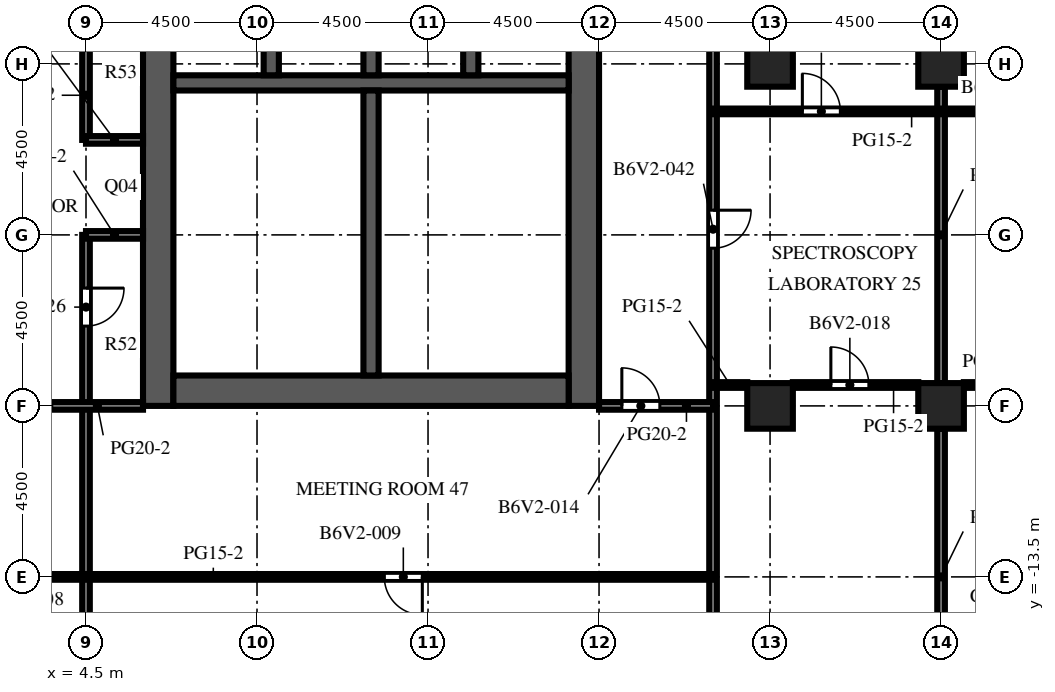
"""IFC4 building model, lengths in metres.
Left out: names, types, materials, properties, quantities, classifications, styles, units other than length and angle.
Written with IfcOpenShell. Run it as: python <this file> out.ifc"""

import sys

from ifc_helpers import new_model, si_unit, direction, frame, frame_2d, origin, origin_2d, place, context, subcontext, project, spatial, rectangle, extrude, element, fill, save


model = new_model("IFC4")
c1 = context("Model", 3, precision=1e-05, world=origin(), true_north=direction((0.0, 1.0)))
c2 = subcontext(c1, "Body", "Model", "MODEL_VIEW")
j1 = project(units=[si_unit("LENGTHUNIT", "METRE"), si_unit("PLANEANGLEUNIT", "RADIAN")], contexts=[c1])
p1 = place(None, origin())
s1 = spatial("IfcSite", under=j1, at=p1, CompositionType="ELEMENT")
p2 = place(p1, origin())
s2 = spatial("IfcBuilding", under=s1, at=p2, CompositionType="ELEMENT")
p3 = place(p2, frame((0.0, 0.0, 216.1)))
s3 = spatial("IfcBuildingStorey", under=s2, at=p3, CompositionType="ELEMENT", Elevation=216.1)
for number, where, z_axis, x_axis in (
    (1, (22.5, -9.0, 0.0), (0.0, 0.0, 1.0), (1.0, 0.0, 0.0)),
    (2, (22.5, 0.0, 0.0), (0.0, 0.0, 1.0), (1.0, 0.0, 0.0)),
    (3, (27.0, -9.0, 0.0), (0.0, 0.0, 1.0), (1.0, 0.0, 0.0)),
    (4, (27.0, 0.0, 0.0), (0.0, 0.0, 1.0), (1.0, 0.0, 0.0)),
):
    element("IfcColumn", number, at=place(p3, frame(where, z_axis=z_axis, x_axis=x_axis)), inside=s3, PredefinedType="COLUMN", context=c2, shape_type="SweptSolid", body=[
        extrude(rectangle(XDim=1.2, YDim=1.2, at=origin_2d()), origin(), (0.0, 0.0, 1.0), 4.1),
    ])
p4 = place(p3, frame((6.4, -9.0, 0.0), z_axis=(0.0, 0.0, 1.0), x_axis=(0.0, 1.0, 0.0)))
e5 = element("IfcWall", 5, at=p4, inside=s3, PredefinedType="SHEAR", context=c2, shape_type="SweptSolid", body=[
    extrude(rectangle(XDim=27.5, YDim=0.8, at=frame_2d((13.75, 0.0))), origin(), (0.0, 0.0, 1.0), 4.1),
])
p5 = place(p4, frame((12.55, 0.0, 0.0)))
e6 = element("IfcOpeningElement", 6, at=p5, cuts=e5, PredefinedType="OPENING", context=c2, shape_type="SweptSolid", body=[
    extrude(rectangle(XDim=2.4, YDim=2.4, at=frame_2d((1.2, 1.2))), frame((0.0, 0.41, 0.0), z_axis=(0.0, -1.0, 0.0), x_axis=(1.0, 0.0, 0.0)), (0.0, 0.0, 1.0), 0.82),
])
p6 = place(p4, frame((5.5, 0.0, 0.0)))
e7 = element("IfcOpeningElement", 7, at=p6, cuts=e5, PredefinedType="OPENING", context=c2, shape_type="SweptSolid", body=[
    extrude(rectangle(XDim=0.95, YDim=2.1, at=frame_2d((0.475, 1.05))), frame((0.0, 0.41, 0.0), z_axis=(0.0, -1.0, 0.0), x_axis=(1.0, 0.0, 0.0)), (0.0, 0.0, 1.0), 0.82),
])
p7 = place(p4, frame((23.475, 0.0, 0.0)))
e8 = element("IfcOpeningElement", 8, at=p7, cuts=e5, PredefinedType="OPENING", context=c2, shape_type="SweptSolid", body=[
    extrude(rectangle(XDim=1.2, YDim=2.1, at=frame_2d((0.6, 1.05))), frame((0.0, 0.41, 0.0), z_axis=(0.0, -1.0, 0.0), x_axis=(1.0, 0.0, 0.0)), (0.0, 0.0, 1.0), 0.82),
])
p8 = place(p3, frame((17.6, -9.0, 0.0), z_axis=(0.0, 0.0, 1.0), x_axis=(0.0, 1.0, 0.0)))
e9 = element("IfcWall", 9, at=p8, inside=s3, PredefinedType="SHEAR", context=c2, shape_type="SweptSolid", body=[
    extrude(rectangle(XDim=27.5, YDim=0.8, at=frame_2d((13.75, 0.0))), origin(), (0.0, 0.0, 1.0), 4.1),
])
p9 = place(p8, frame((12.55, 0.0, 0.0)))
e10 = element("IfcOpeningElement", 10, at=p9, cuts=e9, PredefinedType="OPENING", context=c2, shape_type="SweptSolid", body=[
    extrude(rectangle(XDim=2.4, YDim=2.4, at=frame_2d((1.2, 1.2))), frame((0.0, 0.41, 0.0), z_axis=(0.0, -1.0, 0.0), x_axis=(1.0, 0.0, 0.0)), (0.0, 0.0, 1.0), 0.82),
])
p10 = place(p8, frame((6.825, 0.0, 0.0)))
e11 = element("IfcOpeningElement", 11, at=p10, cuts=e9, PredefinedType="OPENING", context=c2, shape_type="SweptSolid", body=[
    extrude(rectangle(XDim=1.2, YDim=2.1, at=frame_2d((0.6, 1.05))), frame((0.0, 0.41, 0.0), z_axis=(0.0, -1.0, 0.0), x_axis=(1.0, 0.0, 0.0)), (0.0, 0.0, 1.0), 0.82),
])
p11 = place(p8, frame((19.475, 0.0, 0.0)))
e12 = element("IfcOpeningElement", 12, at=p11, cuts=e9, PredefinedType="OPENING", context=c2, shape_type="SweptSolid", body=[
    extrude(rectangle(XDim=1.2, YDim=2.1, at=frame_2d((0.6, 1.05))), frame((0.0, 0.41, 0.0), z_axis=(0.0, -1.0, 0.0), x_axis=(1.0, 0.0, 0.0)), (0.0, 0.0, 1.0), 0.82),
])
p12 = place(p3, frame((6.8, -8.6, 0.0), z_axis=(0.0, 0.0, 1.0), x_axis=(1.0, 0.0, 0.0)))
e13 = element("IfcWall", 13, at=p12, inside=s3, PredefinedType="SHEAR", context=c2, shape_type="SweptSolid", body=[
    extrude(rectangle(XDim=10.4, YDim=0.8, at=frame_2d((5.2, 0.0))), origin(), (0.0, 0.0, 1.0), 4.1),
])
p13 = place(p3, frame((6.8, -0.5, 0.0), z_axis=(0.0, 0.0, 1.0), x_axis=(1.0, 0.0, 0.0)))
e14 = element("IfcWall", 14, at=p13, inside=s3, PredefinedType="SHEAR", context=c2, shape_type="SweptSolid", body=[
    extrude(rectangle(XDim=10.4, YDim=0.4, at=frame_2d((5.2, 0.0))), origin(), (0.0, 0.0, 1.0), 4.1),
])
for number, where, z_axis, x_axis in (
    (15, (9.375, -0.3, 0.0), (0.0, 0.0, 1.0), (0.0, 1.0, 0.0)),
    (16, (12.0, -0.3, 0.0), (0.0, 0.0, 1.0), (0.0, 1.0, 0.0)),
    (17, (14.625, -0.3, 0.0), (0.0, 0.0, 1.0), (0.0, 1.0, 0.0)),
):
    element("IfcWall", number, at=place(p3, frame(where, z_axis=z_axis, x_axis=x_axis)), inside=s3, PredefinedType="SHEAR", context=c2, shape_type="SweptSolid", body=[
        extrude(rectangle(XDim=2.9, YDim=0.4, at=frame_2d((1.45, 0.0))), origin(), (0.0, 0.0, 1.0), 4.1),
    ])
p14 = place(p3, frame((12.0, -8.2, 0.0), z_axis=(0.0, 0.0, 1.0), x_axis=(0.0, 1.0, 0.0)))
e18 = element("IfcWall", 18, at=p14, inside=s3, PredefinedType="SHEAR", context=c2, shape_type="SweptSolid", body=[
    extrude(rectangle(XDim=7.5, YDim=0.4, at=frame_2d((3.75, 0.0))), origin(), (0.0, 0.0, 1.0), 4.1),
])
p15 = place(p3, frame((6.8, -3.7, 0.0), z_axis=(0.0, 0.0, 1.0), x_axis=(1.0, 0.0, 0.0)))
e19 = element("IfcWall", 19, at=p15, inside=s3, PredefinedType="PARTITIONING", context=c2, shape_type="SweptSolid", body=[
    extrude(rectangle(XDim=2.5, YDim=0.1, at=frame_2d((1.25, 0.0))), origin(), (0.0, 0.0, 1.0), 3.5),
])
p16 = place(p15, frame((0.75, 0.0, 0.0)))
e20 = element("IfcOpeningElement", 20, at=p16, cuts=e19, PredefinedType="OPENING", context=c2, shape_type="SweptSolid", body=[
    extrude(rectangle(XDim=1.0, YDim=2.1, at=frame_2d((0.5, 1.05))), frame((0.0, 0.06, 0.0), z_axis=(0.0, -1.0, 0.0), x_axis=(1.0, 0.0, 0.0)), (0.0, 0.0, 1.0), 0.12),
])
p17 = place(p3, frame((9.3, -3.7, 0.0), z_axis=(0.0, 0.0, 1.0), x_axis=(1.0, 0.0, 0.0)))
e21 = element("IfcWall", 21, at=p17, inside=s3, PredefinedType="PARTITIONING", context=c2, shape_type="SweptSolid", body=[
    extrude(rectangle(XDim=2.5, YDim=0.1, at=frame_2d((1.25, 0.0))), origin(), (0.0, 0.0, 1.0), 3.5),
])
p18 = place(p17, frame((0.75, 0.0, 0.0)))
e22 = element("IfcOpeningElement", 22, at=p18, cuts=e21, PredefinedType="OPENING", context=c2, shape_type="SweptSolid", body=[
    extrude(rectangle(XDim=1.0, YDim=2.1, at=frame_2d((0.5, 1.05))), frame((0.0, 0.06, 0.0), z_axis=(0.0, -1.0, 0.0), x_axis=(1.0, 0.0, 0.0)), (0.0, 0.0, 1.0), 0.12),
])
p19 = place(p3, frame((6.8, -2.35, 0.0), z_axis=(0.0, 0.0, 1.0), x_axis=(1.0, 0.0, 0.0)))
e23 = element("IfcWall", 23, at=p19, inside=s3, PredefinedType="PARTITIONING", context=c2, shape_type="SweptSolid", body=[
    extrude(rectangle(XDim=2.5, YDim=0.1, at=frame_2d((1.25, 0.0))), origin(), (0.0, 0.0, 1.0), 3.5),
])
p20 = place(p19, frame((0.75, 0.0, 0.0)))
e24 = element("IfcOpeningElement", 24, at=p20, cuts=e23, PredefinedType="OPENING", context=c2, shape_type="SweptSolid", body=[
    extrude(rectangle(XDim=1.0, YDim=2.1, at=frame_2d((0.5, 1.05))), frame((0.0, 0.06, 0.0), z_axis=(0.0, -1.0, 0.0), x_axis=(1.0, 0.0, 0.0)), (0.0, 0.0, 1.0), 0.12),
])
p21 = place(p3, frame((9.3, -2.35, 0.0), z_axis=(0.0, 0.0, 1.0), x_axis=(1.0, 0.0, 0.0)))
e25 = element("IfcWall", 25, at=p21, inside=s3, PredefinedType="PARTITIONING", context=c2, shape_type="SweptSolid", body=[
    extrude(rectangle(XDim=2.5, YDim=0.1, at=frame_2d((1.25, 0.0))), origin(), (0.0, 0.0, 1.0), 3.5),
])
p22 = place(p21, frame((0.75, 0.0, 0.0)))
e26 = element("IfcOpeningElement", 26, at=p22, cuts=e25, PredefinedType="OPENING", context=c2, shape_type="SweptSolid", body=[
    extrude(rectangle(XDim=1.0, YDim=2.1, at=frame_2d((0.5, 1.05))), frame((0.0, 0.06, 0.0), z_axis=(0.0, -1.0, 0.0), x_axis=(1.0, 0.0, 0.0)), (0.0, 0.0, 1.0), 0.12),
])
p23 = place(p3, frame((9.3, -8.2, 0.0), z_axis=(0.0, 0.0, 1.0), x_axis=(0.0, 1.0, 0.0)))
e27 = element("IfcWall", 27, at=p23, inside=s3, PredefinedType="PARTITIONING", context=c2, shape_type="SweptSolid", body=[
    extrude(rectangle(XDim=4.5, YDim=0.1, at=frame_2d((2.25, 0.0))), origin(), (0.0, 0.0, 1.0), 3.5),
])
p24 = place(p3, frame((9.3, -2.35, 0.0), z_axis=(0.0, 0.0, 1.0), x_axis=(0.0, 1.0, 0.0)))
e28 = element("IfcWall", 28, at=p24, inside=s3, PredefinedType="PARTITIONING", context=c2, shape_type="SweptSolid", body=[
    extrude(rectangle(XDim=1.65, YDim=0.1, at=frame_2d((0.825, 0.0))), origin(), (0.0, 0.0, 1.0), 3.5),
])
p25 = place(p3, frame((4.5, -4.5, 0.0), z_axis=(0.0, 0.0, 1.0), x_axis=(0.0, -1.0, 0.0)))
e29 = element("IfcWall", 29, at=p25, inside=s3, PredefinedType="PARTITIONING", context=c2, shape_type="SweptSolid", body=[
    extrude(rectangle(XDim=22.0, YDim=0.2, at=frame_2d((11.0, 0.0))), origin(), (0.0, 0.0, 1.0), 3.5),
])
p26 = place(p25, frame((1.4, 0.0, 0.0)))
e30 = element("IfcOpeningElement", 30, at=p26, cuts=e29, PredefinedType="OPENING", context=c2, shape_type="SweptSolid", body=[
    extrude(rectangle(XDim=1.0, YDim=2.1, at=frame_2d((0.5, 1.05))), frame((0.0, 0.11, 0.0), z_axis=(0.0, -1.0, 0.0), x_axis=(1.0, 0.0, 0.0)), (0.0, 0.0, 1.0), 0.22),
])
p27 = place(p3, frame((4.5, 2.8, 0.0), z_axis=(0.0, 0.0, 1.0), x_axis=(0.0, -1.0, 0.0)))
e31 = element("IfcWall", 31, at=p27, inside=s3, PredefinedType="PARTITIONING", context=c2, shape_type="SweptSolid", body=[
    extrude(rectangle(XDim=4.8, YDim=0.2, at=frame_2d((2.4, 0.0))), origin(), (0.0, 0.0, 1.0), 3.5),
])
p28 = place(p27, frame((1.45, 0.0, 0.0)))
e32 = element("IfcOpeningElement", 32, at=p28, cuts=e31, PredefinedType="OPENING", context=c2, shape_type="SweptSolid", body=[
    extrude(rectangle(XDim=1.0, YDim=2.1, at=frame_2d((0.5, 1.05))), frame((0.0, 0.11, 0.0), z_axis=(0.0, -1.0, 0.0), x_axis=(1.0, 0.0, 0.0)), (0.0, 0.0, 1.0), 0.22),
])
p29 = place(p3, frame((21.0, 3.25, 0.0), z_axis=(0.0, 0.0, 1.0), x_axis=(0.0, -1.0, 0.0)))
e33 = element("IfcWall", 33, at=p29, inside=s3, PredefinedType="PARTITIONING", context=c2, shape_type="SweptSolid", body=[
    extrude(rectangle(XDim=30.1, YDim=0.2, at=frame_2d((15.05, 0.0))), origin(), (0.0, 0.0, 1.0), 3.5),
])
p30 = place(p29, frame((7.1, 0.0, 0.0)))
e34 = element("IfcOpeningElement", 34, at=p30, cuts=e33, PredefinedType="OPENING", context=c2, shape_type="SweptSolid", body=[
    extrude(rectangle(XDim=1.0, YDim=2.1, at=frame_2d((0.5, 1.05))), frame((0.0, 0.11, 0.0), z_axis=(0.0, -1.0, 0.0), x_axis=(1.0, 0.0, 0.0)), (0.0, 0.0, 1.0), 0.22),
])
for number, where, z_axis, x_axis in (
    (35, (27.0, -17.4, 0.0), (0.0, 0.0, 1.0), (0.0, 1.0, 0.0)),
    (36, (27.0, -8.4, 0.0), (0.0, 0.0, 1.0), (0.0, 1.0, 0.0)),
):
    element("IfcWall", number, at=place(p3, frame(where, z_axis=z_axis, x_axis=x_axis)), inside=s3, PredefinedType="PARTITIONING", context=c2, shape_type="SweptSolid", body=[
        extrude(rectangle(XDim=7.8, YDim=0.2, at=frame_2d((3.9, 0.0))), origin(), (0.0, 0.0, 1.0), 3.5),
    ])
p31 = place(p3, frame((21.0, -13.5, 0.0), z_axis=(0.0, 0.0, 1.0), x_axis=(-1.0, 0.0, 0.0)))
e37 = element("IfcWall", 37, at=p31, inside=s3, PredefinedType="PARTITIONING", context=c2, shape_type="SweptSolid", body=[
    extrude(rectangle(XDim=34.5, YDim=0.15, at=frame_2d((17.25, 0.0))), origin(), (0.0, 0.0, 1.0), 3.5),
])
p32 = place(p31, frame((31.4, 0.0, 0.0)))
e38 = element("IfcOpeningElement", 38, at=p32, cuts=e37, PredefinedType="OPENING", context=c2, shape_type="SweptSolid", body=[
    extrude(rectangle(XDim=1.0, YDim=2.1, at=frame_2d((0.5, 1.05))), frame((0.0, 0.085, 0.0), z_axis=(0.0, -1.0, 0.0), x_axis=(1.0, 0.0, 0.0)), (0.0, 0.0, 1.0), 0.17),
])
p33 = place(p31, frame((24.15, 0.0, 0.0)))
e39 = element("IfcOpeningElement", 39, at=p33, cuts=e37, PredefinedType="OPENING", context=c2, shape_type="SweptSolid", body=[
    extrude(rectangle(XDim=1.0, YDim=2.1, at=frame_2d((0.5, 1.05))), frame((0.0, 0.085, 0.0), z_axis=(0.0, -1.0, 0.0), x_axis=(1.0, 0.0, 0.0)), (0.0, 0.0, 1.0), 0.17),
])
p34 = place(p31, frame((17.65, 0.0, 0.0)))
e40 = element("IfcOpeningElement", 40, at=p34, cuts=e37, PredefinedType="OPENING", context=c2, shape_type="SweptSolid", body=[
    extrude(rectangle(XDim=1.0, YDim=2.1, at=frame_2d((0.5, 1.05))), frame((0.0, 0.085, 0.0), z_axis=(0.0, -1.0, 0.0), x_axis=(1.0, 0.0, 0.0)), (0.0, 0.0, 1.0), 0.17),
])
p35 = place(p31, frame((7.65, 0.0, 0.0)))
e41 = element("IfcOpeningElement", 41, at=p35, cuts=e37, PredefinedType="OPENING", context=c2, shape_type="SweptSolid", body=[
    extrude(rectangle(XDim=1.0, YDim=2.1, at=frame_2d((0.5, 1.05))), frame((0.0, 0.085, 0.0), z_axis=(0.0, -1.0, 0.0), x_axis=(1.0, 0.0, 0.0)), (0.0, 0.0, 1.0), 0.17),
])
p36 = place(p3, frame((6.0, -9.0, 0.0), z_axis=(0.0, 0.0, 1.0), x_axis=(-1.0, 0.0, 0.0)))
e42 = element("IfcWall", 42, at=p36, inside=s3, PredefinedType="PARTITIONING", context=c2, shape_type="SweptSolid", body=[
    extrude(rectangle(XDim=4.5, YDim=0.2, at=frame_2d((2.25, 0.0))), origin(), (0.0, 0.0, 1.0), 3.5),
])
p37 = place(p36, frame((2.4, 0.0, 0.0)))
e43 = element("IfcOpeningElement", 43, at=p37, cuts=e42, PredefinedType="OPENING", context=c2, shape_type="SweptSolid", body=[
    extrude(rectangle(XDim=1.0, YDim=2.1, at=frame_2d((0.5, 1.05))), frame((0.0, 0.11, 0.0), z_axis=(0.0, -1.0, 0.0), x_axis=(1.0, 0.0, 0.0)), (0.0, 0.0, 1.0), 0.22),
])
p38 = place(p3, frame((21.0, -9.0, 0.0), z_axis=(0.0, 0.0, 1.0), x_axis=(-1.0, 0.0, 0.0)))
e44 = element("IfcWall", 44, at=p38, inside=s3, PredefinedType="PARTITIONING", context=c2, shape_type="SweptSolid", body=[
    extrude(rectangle(XDim=3.0, YDim=0.2, at=frame_2d((1.5, 0.0))), origin(), (0.0, 0.0, 1.0), 3.5),
])
p39 = place(p38, frame((1.4, 0.0, 0.0)))
e45 = element("IfcOpeningElement", 45, at=p39, cuts=e44, PredefinedType="OPENING", context=c2, shape_type="SweptSolid", body=[
    extrude(rectangle(XDim=1.0, YDim=2.1, at=frame_2d((0.5, 1.05))), frame((0.0, 0.11, 0.0), z_axis=(0.0, -1.0, 0.0), x_axis=(1.0, 0.0, 0.0)), (0.0, 0.0, 1.0), 0.22),
])
p40 = place(p3, frame((21.0, -8.45, 0.0), z_axis=(0.0, 0.0, 1.0), x_axis=(1.0, 0.0, 0.0)))
e46 = element("IfcWall", 46, at=p40, inside=s3, PredefinedType="PARTITIONING", context=c2, shape_type="SweptSolid", body=[
    extrude(rectangle(XDim=0.9, YDim=0.15, at=frame_2d((0.45, 0.0))), origin(), (0.0, 0.0, 1.0), 3.5),
])
p41 = place(p3, frame((26.4, -8.45, 0.0), z_axis=(0.0, 0.0, 1.0), x_axis=(-1.0, 0.0, 0.0)))
e47 = element("IfcWall", 47, at=p41, inside=s3, PredefinedType="PARTITIONING", context=c2, shape_type="SweptSolid", body=[
    extrude(rectangle(XDim=3.3, YDim=0.15, at=frame_2d((1.65, 0.0))), origin(), (0.0, 0.0, 1.0), 3.5),
])
p42 = place(p41, frame((1.3, 0.0, 0.0)))
e48 = element("IfcOpeningElement", 48, at=p42, cuts=e47, PredefinedType="OPENING", context=c2, shape_type="SweptSolid", body=[
    extrude(rectangle(XDim=1.0, YDim=2.1, at=frame_2d((0.5, 1.05))), frame((0.0, 0.085, 0.0), z_axis=(0.0, -1.0, 0.0), x_axis=(1.0, 0.0, 0.0)), (0.0, 0.0, 1.0), 0.17),
])
p43 = place(p3, frame((31.0, -8.45, 0.0), z_axis=(0.0, 0.0, 1.0), x_axis=(-1.0, 0.0, 0.0)))
e49 = element("IfcWall", 49, at=p43, inside=s3, PredefinedType="PARTITIONING", context=c2, shape_type="SweptSolid", body=[
    extrude(rectangle(XDim=3.4, YDim=0.15, at=frame_2d((1.7, 0.0))), origin(), (0.0, 0.0, 1.0), 3.5),
])
p44 = place(p43, frame((0.9, 0.0, 0.0)))
e50 = element("IfcOpeningElement", 50, at=p44, cuts=e49, PredefinedType="OPENING", context=c2, shape_type="SweptSolid", body=[
    extrude(rectangle(XDim=1.0, YDim=2.1, at=frame_2d((0.5, 1.05))), frame((0.0, 0.085, 0.0), z_axis=(0.0, -1.0, 0.0), x_axis=(1.0, 0.0, 0.0)), (0.0, 0.0, 1.0), 0.17),
])
for number, where, z_axis, x_axis in (
    (51, (4.5, -4.5, 0.0), (0.0, 0.0, 1.0), (1.0, 0.0, 0.0)),
    (52, (4.5, -2.0, 0.0), (0.0, 0.0, 1.0), (1.0, 0.0, 0.0)),
):
    element("IfcWall", number, at=place(p3, frame(where, z_axis=z_axis, x_axis=x_axis)), inside=s3, PredefinedType="PARTITIONING", context=c2, shape_type="SweptSolid", body=[
        extrude(rectangle(XDim=1.5, YDim=0.2, at=frame_2d((0.75, 0.0))), origin(), (0.0, 0.0, 1.0), 3.5),
    ])
p45 = place(p3, frame((21.0, -1.25, 0.0), z_axis=(0.0, 0.0, 1.0), x_axis=(1.0, 0.0, 0.0)))
e53 = element("IfcWall", 53, at=p45, inside=s3, PredefinedType="PARTITIONING", context=c2, shape_type="SweptSolid", body=[
    extrude(rectangle(XDim=10.35, YDim=0.15, at=frame_2d((5.175, 0.0))), origin(), (0.0, 0.0, 1.0), 3.5),
])
p46 = place(p45, frame((2.35, 0.0, 0.0)))
e54 = element("IfcOpeningElement", 54, at=p46, cuts=e53, PredefinedType="OPENING", context=c2, shape_type="SweptSolid", body=[
    extrude(rectangle(XDim=1.0, YDim=2.1, at=frame_2d((0.5, 1.05))), frame((0.0, 0.085, 0.0), z_axis=(0.0, -1.0, 0.0), x_axis=(1.0, 0.0, 0.0)), (0.0, 0.0, 1.0), 0.17),
])
p47 = place(p45, frame((7.1, 0.0, 0.0)))
e55 = element("IfcOpeningElement", 55, at=p47, cuts=e53, PredefinedType="OPENING", context=c2, shape_type="SweptSolid", body=[
    extrude(rectangle(XDim=1.0, YDim=2.1, at=frame_2d((0.5, 1.05))), frame((0.0, 0.085, 0.0), z_axis=(0.0, -1.0, 0.0), x_axis=(1.0, 0.0, 0.0)), (0.0, 0.0, 1.0), 0.17),
])
p48 = place(p10, frame((1.2, 0.0, 0.0), z_axis=(0.0, 0.0, 1.0), x_axis=(-1.0, 0.0, 0.0)))
e56 = element("IfcDoor", 56, at=p48, inside=s3, OperationType="SINGLE_SWING_LEFT", PredefinedType="DOOR", context=c2, shape_type="SweptSolid", body=[
    extrude(rectangle(XDim=1.2, YDim=2.1, at=frame_2d((0.6, 1.05))), frame((0.0, 0.025, 0.0), z_axis=(0.0, -1.0, 0.0), x_axis=(1.0, 0.0, 0.0)), (0.0, 0.0, 1.0), 0.05),
])
fill(e11, e56)
p49 = place(p6, origin())
e57 = element("IfcDoor", 57, at=p49, inside=s3, OperationType="SINGLE_SWING_RIGHT", PredefinedType="DOOR", context=c2, shape_type="SweptSolid", body=[
    extrude(rectangle(XDim=0.95, YDim=2.1, at=frame_2d((0.475, 1.05))), frame((0.0, -0.325, 0.0), z_axis=(0.0, -1.0, 0.0), x_axis=(1.0, 0.0, 0.0)), (0.0, 0.0, 1.0), 0.05),
])
fill(e7, e57)
p50 = place(p16, origin())
e58 = element("IfcDoor", 58, at=p50, inside=s3, OperationType="SINGLE_SWING_LEFT", PredefinedType="DOOR", context=c2, shape_type="SweptSolid", body=[
    extrude(rectangle(XDim=1.0, YDim=2.1, at=frame_2d((0.5, 1.05))), frame((0.0, 0.025, 0.0), z_axis=(0.0, -1.0, 0.0), x_axis=(1.0, 0.0, 0.0)), (0.0, 0.0, 1.0), 0.05),
])
fill(e20, e58)
p51 = place(p18, origin())
e59 = element("IfcDoor", 59, at=p51, inside=s3, OperationType="SINGLE_SWING_RIGHT", PredefinedType="DOOR", context=c2, shape_type="SweptSolid", body=[
    extrude(rectangle(XDim=1.0, YDim=2.1, at=frame_2d((0.5, 1.05))), frame((0.0, 0.025, 0.0), z_axis=(0.0, -1.0, 0.0), x_axis=(1.0, 0.0, 0.0)), (0.0, 0.0, 1.0), 0.05),
])
fill(e22, e59)
p52 = place(p20, origin())
e60 = element("IfcDoor", 60, at=p52, inside=s3, OperationType="SINGLE_SWING_LEFT", PredefinedType="DOOR", context=c2, shape_type="SweptSolid", body=[
    extrude(rectangle(XDim=1.0, YDim=2.1, at=frame_2d((0.5, 1.05))), frame((0.0, 0.025, 0.0), z_axis=(0.0, -1.0, 0.0), x_axis=(1.0, 0.0, 0.0)), (0.0, 0.0, 1.0), 0.05),
])
fill(e24, e60)
p53 = place(p22, origin())
e61 = element("IfcDoor", 61, at=p53, inside=s3, OperationType="SINGLE_SWING_RIGHT", PredefinedType="DOOR", context=c2, shape_type="SweptSolid", body=[
    extrude(rectangle(XDim=1.0, YDim=2.1, at=frame_2d((0.5, 1.05))), frame((0.0, 0.025, 0.0), z_axis=(0.0, -1.0, 0.0), x_axis=(1.0, 0.0, 0.0)), (0.0, 0.0, 1.0), 0.05),
])
fill(e26, e61)
p54 = place(p35, origin())
e62 = element("IfcDoor", 62, at=p54, inside=s3, OperationType="SINGLE_SWING_LEFT", PredefinedType="DOOR", context=c2, shape_type="SweptSolid", body=[
    extrude(rectangle(XDim=1.0, YDim=2.1, at=frame_2d((0.5, 1.05))), frame((0.0, 0.025, 0.0), z_axis=(0.0, -1.0, 0.0), x_axis=(1.0, 0.0, 0.0)), (0.0, 0.0, 1.0), 0.05),
])
fill(e41, e62)
p55 = place(p39, origin())
e63 = element("IfcDoor", 63, at=p55, inside=s3, OperationType="SINGLE_SWING_RIGHT", PredefinedType="DOOR", context=c2, shape_type="SweptSolid", body=[
    extrude(rectangle(XDim=1.0, YDim=2.1, at=frame_2d((0.5, 1.05))), frame((0.0, 0.025, 0.0), z_axis=(0.0, -1.0, 0.0), x_axis=(1.0, 0.0, 0.0)), (0.0, 0.0, 1.0), 0.05),
])
fill(e45, e63)
p56 = place(p42, origin())
e64 = element("IfcDoor", 64, at=p56, inside=s3, OperationType="SINGLE_SWING_RIGHT", PredefinedType="DOOR", context=c2, shape_type="SweptSolid", body=[
    extrude(rectangle(XDim=1.0, YDim=2.1, at=frame_2d((0.5, 1.05))), frame((0.0, 0.025, 0.0), z_axis=(0.0, -1.0, 0.0), x_axis=(1.0, 0.0, 0.0)), (0.0, 0.0, 1.0), 0.05),
])
fill(e48, e64)
p57 = place(p46, origin())
e65 = element("IfcDoor", 65, at=p57, inside=s3, OperationType="SINGLE_SWING_LEFT", PredefinedType="DOOR", context=c2, shape_type="SweptSolid", body=[
    extrude(rectangle(XDim=1.0, YDim=2.1, at=frame_2d((0.5, 1.05))), frame((0.0, 0.025, 0.0), z_axis=(0.0, -1.0, 0.0), x_axis=(1.0, 0.0, 0.0)), (0.0, 0.0, 1.0), 0.05),
])
fill(e54, e65)
p58 = place(p26, origin())
e66 = element("IfcDoor", 66, at=p58, inside=s3, OperationType="SINGLE_SWING_LEFT", PredefinedType="DOOR", context=c2, shape_type="SweptSolid", body=[
    extrude(rectangle(XDim=1.0, YDim=2.1, at=frame_2d((0.5, 1.05))), frame((0.0, 0.025, 0.0), z_axis=(0.0, -1.0, 0.0), x_axis=(1.0, 0.0, 0.0)), (0.0, 0.0, 1.0), 0.05),
])
fill(e30, e66)
p59 = place(p30, origin())
e67 = element("IfcDoor", 67, at=p59, inside=s3, OperationType="SINGLE_SWING_LEFT", PredefinedType="DOOR", context=c2, shape_type="SweptSolid", body=[
    extrude(rectangle(XDim=1.0, YDim=2.1, at=frame_2d((0.5, 1.05))), frame((0.0, 0.025, 0.0), z_axis=(0.0, -1.0, 0.0), x_axis=(1.0, 0.0, 0.0)), (0.0, 0.0, 1.0), 0.05),
])
fill(e34, e67)
save(model, sys.argv[1])
